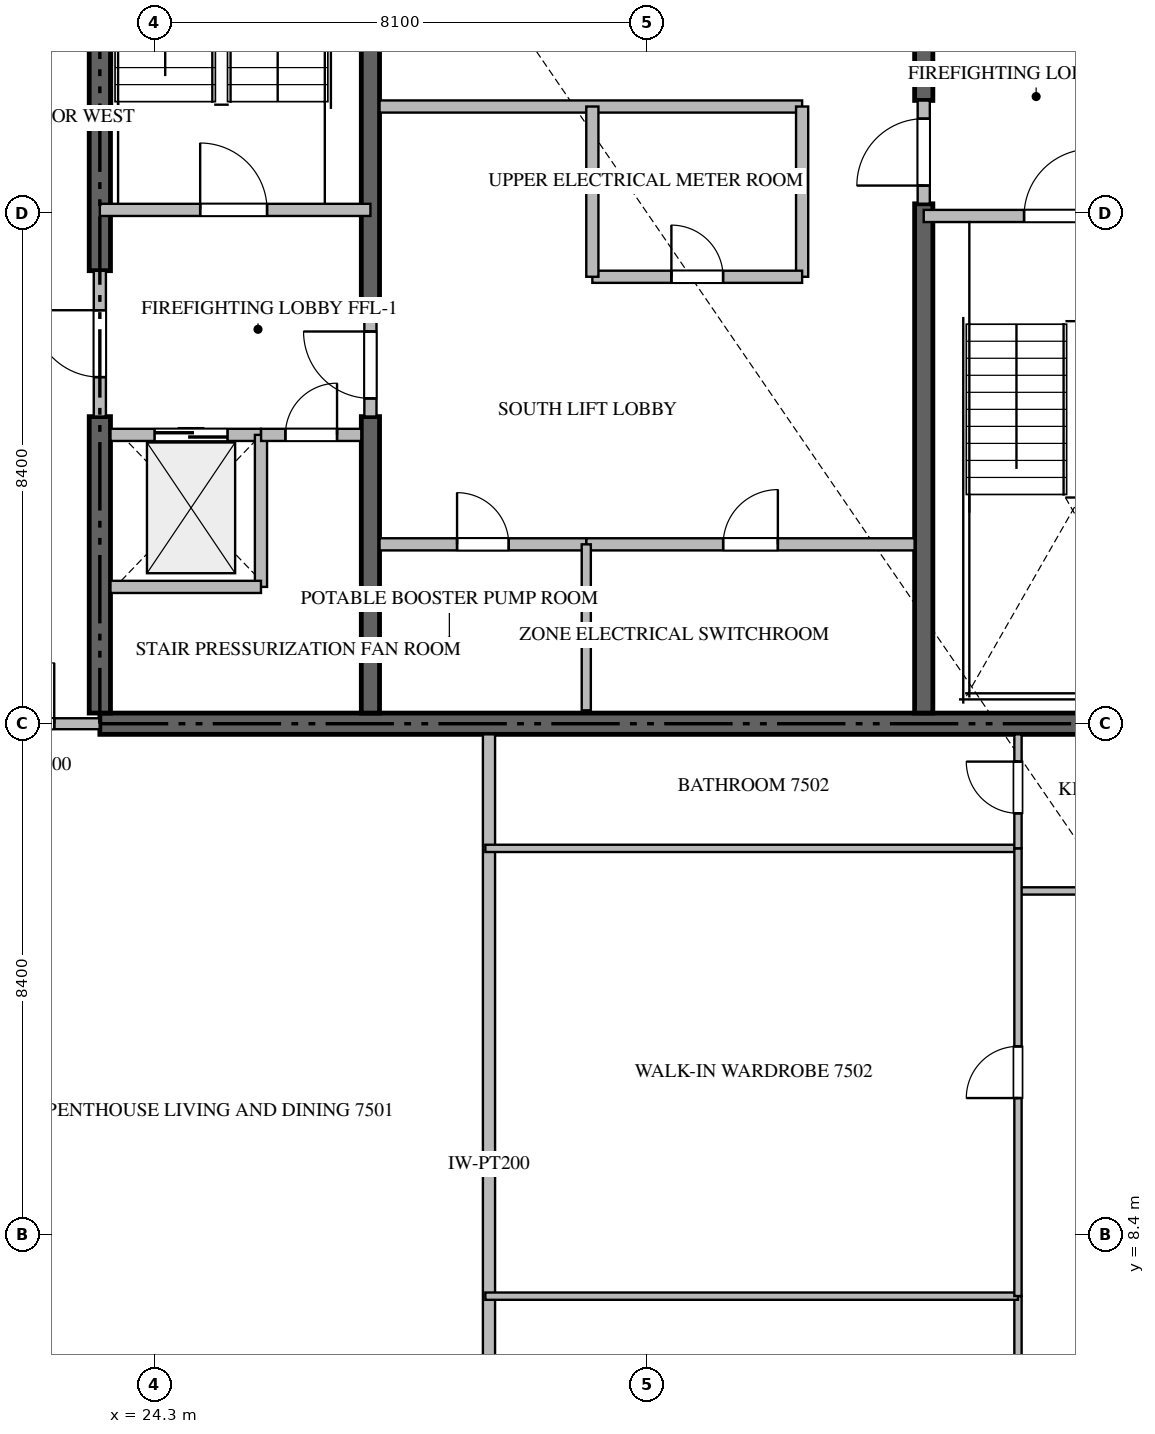
"""IFC4 building model, lengths in metres.
Left out: names, types, materials, properties, quantities, classifications, styles, units other than length and angle.
Written with IfcOpenShell. Run it as: python <this file> out.ifc"""

import sys

from ifc_helpers import new_model, si_unit, direction, frame, frame_2d, origin, place, context, subcontext, project, spatial, rectangle, extrude, source, transform, mapped, element, fill, save


model = new_model("IFC4")
c1 = context("Model", 3, precision=1e-05, world=origin(), true_north=direction((0.0, 1.0)))
c2 = subcontext(c1, "Body", "Model", "MODEL_VIEW")
j1 = project(units=[si_unit("LENGTHUNIT", "METRE"), si_unit("PLANEANGLEUNIT", "RADIAN")], contexts=[c1])
p1 = place(None, origin())
s1 = spatial("IfcSite", under=j1, at=p1, CompositionType="ELEMENT")
p2 = place(p1, origin())
s2 = spatial("IfcBuilding", under=s1, at=p2, CompositionType="ELEMENT")
p3 = place(p2, frame((0.0, 0.0, 301.55)))
s3 = spatial("IfcBuildingStorey", under=s2, at=p3, CompositionType="ELEMENT", Elevation=301.55)
p4 = place(p3, frame((23.4, 16.8, -0.26), z_axis=(0.0, 0.0, 1.0), x_axis=(1.0, 0.0, 0.0)))
e1 = element("IfcWall", 1, at=p4, inside=s3, PredefinedType="SHEAR", context=c2, shape_type="SweptSolid", body=[
    extrude(rectangle(XDim=18.0, YDim=0.35, at=frame_2d((9.0, 0.0))), origin(), (0.0, 0.0, 1.0), 4.048),
])
p5 = place(p3, frame((23.4, 16.975, -0.26), z_axis=(0.0, 0.0, 1.0), x_axis=(0.0, 1.0, 0.0)))
e2 = element("IfcWall", 2, at=p5, inside=s3, PredefinedType="SHEAR", context=c2, shape_type="SweptSolid", body=[
    extrude(rectangle(XDim=4.875, YDim=0.35, at=frame_2d((2.438, 0.0))), origin(), (0.0, 0.0, 1.0), 4.048),
])
p6 = place(p3, frame((23.4, 24.25, -0.26), z_axis=(0.0, 0.0, 1.0), x_axis=(0.0, 1.0, 0.0)))
e3 = element("IfcWall", 3, at=p6, inside=s3, PredefinedType="SHEAR", context=c2, shape_type="SweptSolid", body=[
    extrude(rectangle(XDim=9.175, YDim=0.35, at=frame_2d((4.587, 0.0))), origin(), (0.0, 0.0, 1.0), 4.048),
])
p7 = place(p3, frame((27.85, 16.975, -0.26), z_axis=(0.0, 0.0, 1.0), x_axis=(0.0, 1.0, 0.0)))
e4 = element("IfcWall", 4, at=p7, inside=s3, PredefinedType="SHEAR", context=c2, shape_type="SweptSolid", body=[
    extrude(rectangle(XDim=4.875, YDim=0.3, at=frame_2d((2.438, 0.0))), origin(), (0.0, 0.0, 1.0), 4.048),
])
p8 = place(p3, frame((27.85, 23.55, -0.26), z_axis=(0.0, 0.0, 1.0), x_axis=(0.0, 1.0, 0.0)))
e5 = element("IfcWall", 5, at=p8, inside=s3, PredefinedType="SHEAR", context=c2, shape_type="SweptSolid", body=[
    extrude(rectangle(XDim=9.875, YDim=0.3, at=frame_2d((4.938, 0.0))), origin(), (0.0, 0.0, 1.0), 4.048),
])
p9 = place(p3, frame((36.95, 16.975, -0.26), z_axis=(0.0, 0.0, 1.0), x_axis=(0.0, 1.0, 0.0)))
e6 = element("IfcWall", 6, at=p9, inside=s3, PredefinedType="SHEAR", context=c2, shape_type="SweptSolid", body=[
    extrude(rectangle(XDim=8.375, YDim=0.3, at=frame_2d((4.188, 0.0))), origin(), (0.0, 0.0, 1.0), 4.048),
])
p10 = place(p3, frame((36.95, 27.05, -0.26), z_axis=(0.0, 0.0, 1.0), x_axis=(0.0, 1.0, 0.0)))
e7 = element("IfcWall", 7, at=p10, inside=s3, PredefinedType="SHEAR", context=c2, shape_type="SweptSolid", body=[
    extrude(rectangle(XDim=6.375, YDim=0.3, at=frame_2d((3.188, 0.0))), origin(), (0.0, 0.0, 1.0), 4.048),
])
p11 = place(p3, frame((23.4, 25.25, 0.0), z_axis=(0.0, 0.0, 1.0), x_axis=(1.0, 0.0, 0.0)))
e8 = element("IfcWall", 8, at=p11, inside=s3, PredefinedType="STANDARD", context=c2, shape_type="SweptSolid", body=[
    extrude(rectangle(XDim=4.45, YDim=0.2, at=frame_2d((2.225, 0.0))), origin(), (0.0, 0.0, 1.0), 3.79),
])
p12 = place(p11, frame((1.65, 0.0, 0.0)))
e9 = element("IfcOpeningElement", 9, at=p12, cuts=e8, PredefinedType="OPENING", context=c2, shape_type="SweptSolid", body=[
    extrude(rectangle(XDim=1.1, YDim=2.15, at=frame_2d((0.55, 1.075))), frame((0.0, 0.11, 0.0), z_axis=(0.0, -1.0, 0.0), x_axis=(1.0, 0.0, 0.0)), (0.0, 0.0, 1.0), 0.22),
])
p13 = place(p3, frame((36.95, 25.15, 0.0), z_axis=(0.0, 0.0, 1.0), x_axis=(1.0, 0.0, 0.0)))
e10 = element("IfcWall", 10, at=p13, inside=s3, PredefinedType="STANDARD", context=c2, shape_type="SweptSolid", body=[
    extrude(rectangle(XDim=4.45, YDim=0.2, at=frame_2d((2.225, 0.0))), origin(), (0.0, 0.0, 1.0), 3.79),
])
p14 = place(p13, frame((1.65, 0.0, 0.0)))
e11 = element("IfcOpeningElement", 11, at=p14, cuts=e10, PredefinedType="OPENING", context=c2, shape_type="SweptSolid", body=[
    extrude(rectangle(XDim=1.1, YDim=2.15, at=frame_2d((0.55, 1.075))), frame((0.0, 0.11, 0.0), z_axis=(0.0, -1.0, 0.0), x_axis=(1.0, 0.0, 0.0)), (0.0, 0.0, 1.0), 0.22),
])
p15 = place(p3, frame((23.575, 21.55, 0.0), z_axis=(0.0, 0.0, 1.0), x_axis=(1.0, 0.0, 0.0)))
e12 = element("IfcWall", 12, at=p15, inside=s3, PredefinedType="STANDARD", context=c2, shape_type="SweptSolid", body=[
    extrude(rectangle(XDim=2.475, YDim=0.2, at=frame_2d((1.238, 0.0))), origin(), (0.0, 0.0, 1.0), 3.79),
])
p16 = place(p15, frame((0.725, 0.0, 0.0)))
e13 = element("IfcOpeningElement", 13, at=p16, cuts=e12, PredefinedType="OPENING", context=c2, shape_type="SweptSolid", body=[
    extrude(rectangle(XDim=1.2, YDim=2.2, at=frame_2d((0.6, 1.1))), frame((0.0, 0.11, 0.0), z_axis=(0.0, -1.0, 0.0), x_axis=(1.0, 0.0, 0.0)), (0.0, 0.0, 1.0), 0.22),
])
p17 = place(p3, frame((26.05, 19.05, 0.0), z_axis=(0.0, 0.0, 1.0), x_axis=(0.0, 1.0, 0.0)))
e14 = element("IfcWall", 14, at=p17, inside=s3, PredefinedType="STANDARD", context=c2, shape_type="SweptSolid", body=[
    extrude(rectangle(XDim=2.5, YDim=0.2, at=frame_2d((1.25, 0.0))), origin(), (0.0, 0.0, 1.0), 3.79),
])
p18 = place(p3, frame((23.575, 19.05, 0.0), z_axis=(0.0, 0.0, 1.0), x_axis=(1.0, 0.0, 0.0)))
e15 = element("IfcWall", 15, at=p18, inside=s3, PredefinedType="STANDARD", context=c2, shape_type="SweptSolid", body=[
    extrude(rectangle(XDim=2.475, YDim=0.2, at=frame_2d((1.238, 0.0))), origin(), (0.0, 0.0, 1.0), 3.79),
])
p19 = place(p3, frame((26.052, 21.55, 0.0), z_axis=(0.0, 0.0, 1.0), x_axis=(1.0, 0.0, 0.0)))
e16 = element("IfcWall", 16, at=p19, inside=s3, PredefinedType="STANDARD", context=c2, shape_type="SweptSolid", body=[
    extrude(rectangle(XDim=1.648, YDim=0.2, at=frame_2d((0.824, 0.0))), origin(), (0.0, 0.0, 1.0), 3.79),
])
p20 = place(p19, frame((0.399, 0.0, 0.0)))
e17 = element("IfcOpeningElement", 17, at=p20, cuts=e16, PredefinedType="OPENING", context=c2, shape_type="SweptSolid", body=[
    extrude(rectangle(XDim=0.85, YDim=2.1, at=frame_2d((0.425, 1.05))), frame((0.0, 0.11, 0.0), z_axis=(0.0, -1.0, 0.0), x_axis=(1.0, 0.0, 0.0)), (0.0, 0.0, 1.0), 0.22),
])
p21 = place(p3, frame((23.4, 21.852, 0.0), z_axis=(0.0, 0.0, 1.0), x_axis=(0.0, 1.0, 0.0)))
e18 = element("IfcWall", 18, at=p21, inside=s3, PredefinedType="STANDARD", context=c2, shape_type="SweptSolid", body=[
    extrude(rectangle(XDim=2.396, YDim=0.2, at=frame_2d((1.198, 0.0))), origin(), (0.0, 0.0, 1.0), 3.79),
])
p22 = place(p21, frame((0.648, 0.0, 0.0)))
e19 = element("IfcOpeningElement", 19, at=p22, cuts=e18, PredefinedType="OPENING", context=c2, shape_type="SweptSolid", body=[
    extrude(rectangle(XDim=1.1, YDim=2.15, at=frame_2d((0.55, 1.075))), frame((0.0, 0.11, 0.0), z_axis=(0.0, -1.0, 0.0), x_axis=(1.0, 0.0, 0.0)), (0.0, 0.0, 1.0), 0.22),
])
p23 = place(p3, frame((27.85, 21.852, 0.0), z_axis=(0.0, 0.0, 1.0), x_axis=(0.0, 1.0, 0.0)))
e20 = element("IfcWall", 20, at=p23, inside=s3, PredefinedType="STANDARD", context=c2, shape_type="SweptSolid", body=[
    extrude(rectangle(XDim=1.696, YDim=0.2, at=frame_2d((0.848, 0.0))), origin(), (0.0, 0.0, 1.0), 3.79),
])
p24 = place(p23, frame((0.298, 0.0, 0.0)))
e21 = element("IfcOpeningElement", 21, at=p24, cuts=e20, PredefinedType="OPENING", context=c2, shape_type="SweptSolid", body=[
    extrude(rectangle(XDim=1.1, YDim=2.15, at=frame_2d((0.55, 1.075))), frame((0.0, 0.11, 0.0), z_axis=(0.0, -1.0, 0.0), x_axis=(1.0, 0.0, 0.0)), (0.0, 0.0, 1.0), 0.22),
])
p25 = place(p3, frame((36.95, 25.352, 0.0), z_axis=(0.0, 0.0, 1.0), x_axis=(0.0, 1.0, 0.0)))
e22 = element("IfcWall", 22, at=p25, inside=s3, PredefinedType="STANDARD", context=c2, shape_type="SweptSolid", body=[
    extrude(rectangle(XDim=1.696, YDim=0.2, at=frame_2d((0.848, 0.0))), origin(), (0.0, 0.0, 1.0), 3.79),
])
p26 = place(p25, frame((0.298, 0.0, 0.0)))
e23 = element("IfcOpeningElement", 23, at=p26, cuts=e22, PredefinedType="OPENING", context=c2, shape_type="SweptSolid", body=[
    extrude(rectangle(XDim=1.1, YDim=2.15, at=frame_2d((0.55, 1.075))), frame((0.0, 0.11, 0.0), z_axis=(0.0, -1.0, 0.0), x_axis=(1.0, 0.0, 0.0)), (0.0, 0.0, 1.0), 0.22),
])
p27 = place(p3, frame((28.0, 19.75, 0.0), z_axis=(0.0, 0.0, 1.0), x_axis=(1.0, 0.0, 0.0)))
e24 = element("IfcWall", 24, at=p27, inside=s3, PredefinedType="STANDARD", context=c2, shape_type="SweptSolid", body=[
    extrude(rectangle(XDim=3.4, YDim=0.2, at=frame_2d((1.7, 0.0))), origin(), (0.0, 0.0, 1.0), 3.79),
])
p28 = place(p27, frame((1.275, 0.0, 0.0)))
e25 = element("IfcOpeningElement", 25, at=p28, cuts=e24, PredefinedType="OPENING", context=c2, shape_type="SweptSolid", body=[
    extrude(rectangle(XDim=0.85, YDim=2.1, at=frame_2d((0.425, 1.05))), frame((0.0, 0.11, 0.0), z_axis=(0.0, -1.0, 0.0), x_axis=(1.0, 0.0, 0.0)), (0.0, 0.0, 1.0), 0.22),
])
p29 = place(p3, frame((31.402, 19.75, 0.0), z_axis=(0.0, 0.0, 1.0), x_axis=(1.0, 0.0, 0.0)))
e26 = element("IfcWall", 26, at=p29, inside=s3, PredefinedType="STANDARD", context=c2, shape_type="SweptSolid", body=[
    extrude(rectangle(XDim=5.398, YDim=0.2, at=frame_2d((2.699, 0.0))), origin(), (0.0, 0.0, 1.0), 3.79),
])
p30 = place(p29, frame((2.249, 0.0, 0.0)))
e27 = element("IfcOpeningElement", 27, at=p30, cuts=e26, PredefinedType="OPENING", context=c2, shape_type="SweptSolid", body=[
    extrude(rectangle(XDim=0.9, YDim=2.1, at=frame_2d((0.45, 1.05))), frame((0.0, 0.11, 0.0), z_axis=(0.0, -1.0, 0.0), x_axis=(1.0, 0.0, 0.0)), (0.0, 0.0, 1.0), 0.22),
])
p31 = place(p3, frame((31.4, 17.02, 0.0), z_axis=(0.0, 0.0, 1.0), x_axis=(0.0, 1.0, 0.0)))
e28 = element("IfcWall", 28, at=p31, inside=s3, PredefinedType="PARTITIONING", context=c2, shape_type="SweptSolid", body=[
    extrude(rectangle(XDim=2.73, YDim=0.15, at=frame_2d((1.365, 0.0))), origin(), (0.0, 0.0, 1.0), 3.79),
])
p32 = place(p3, frame((28.0, 26.95, 0.0), z_axis=(0.0, 0.0, 1.0), x_axis=(1.0, 0.0, 0.0)))
e29 = element("IfcWall", 29, at=p32, inside=s3, PredefinedType="STANDARD", context=c2, shape_type="SweptSolid", body=[
    extrude(rectangle(XDim=6.95, YDim=0.2, at=frame_2d((3.475, 0.0))), origin(), (0.0, 0.0, 1.0), 3.79),
])
p33 = place(p3, frame((34.95, 24.15, 0.0), z_axis=(0.0, 0.0, 1.0), x_axis=(0.0, 1.0, 0.0)))
e30 = element("IfcWall", 30, at=p33, inside=s3, PredefinedType="STANDARD", context=c2, shape_type="SweptSolid", body=[
    extrude(rectangle(XDim=2.8, YDim=0.2, at=frame_2d((1.4, 0.0))), origin(), (0.0, 0.0, 1.0), 3.79),
])
p34 = place(p3, frame((31.5, 24.15, 0.0), z_axis=(0.0, 0.0, 1.0), x_axis=(1.0, 0.0, 0.0)))
e31 = element("IfcWall", 31, at=p34, inside=s3, PredefinedType="STANDARD", context=c2, shape_type="SweptSolid", body=[
    extrude(rectangle(XDim=3.45, YDim=0.2, at=frame_2d((1.725, 0.0))), origin(), (0.0, 0.0, 1.0), 3.79),
])
p35 = place(p34, frame((1.3, 0.0, 0.0)))
e32 = element("IfcOpeningElement", 32, at=p35, cuts=e31, PredefinedType="OPENING", context=c2, shape_type="SweptSolid", body=[
    extrude(rectangle(XDim=0.85, YDim=2.1, at=frame_2d((0.425, 1.05))), frame((0.0, 0.11, 0.0), z_axis=(0.0, -1.0, 0.0), x_axis=(1.0, 0.0, 0.0)), (0.0, 0.0, 1.0), 0.22),
])
p36 = place(p3, frame((31.5, 24.15, 0.0), z_axis=(0.0, 0.0, 1.0), x_axis=(0.0, 1.0, 0.0)))
e33 = element("IfcWall", 33, at=p36, inside=s3, PredefinedType="STANDARD", context=c2, shape_type="SweptSolid", body=[
    extrude(rectangle(XDim=2.8, YDim=0.2, at=frame_2d((1.4, 0.0))), origin(), (0.0, 0.0, 1.0), 3.79),
])
p37 = place(p3, frame((29.8, 2.482, 0.0), z_axis=(0.0, 0.0, 1.0), x_axis=(0.0, 1.0, 0.0)))
e34 = element("IfcWall", 34, at=p37, inside=s3, PredefinedType="PARTITIONING", context=c2, shape_type="SweptSolid", body=[
    extrude(rectangle(XDim=14.143, YDim=0.2, at=frame_2d((7.072, 0.0))), origin(), (0.0, 0.0, 1.0), 3.79),
])
p38 = place(p3, frame((20.902, 16.8, 0.0), z_axis=(0.0, 0.0, 1.0), x_axis=(1.0, 0.0, 0.0)))
e35 = element("IfcWall", 35, at=p38, inside=s3, PredefinedType="PARTITIONING", context=c2, shape_type="SweptSolid", body=[
    extrude(rectangle(XDim=2.496, YDim=0.18, at=frame_2d((1.248, 0.0))), origin(), (0.0, 0.0, 1.0), 3.79),
])
p39 = place(p38, frame((0.748, 0.0, 0.0)))
e36 = element("IfcOpeningElement", 36, at=p39, cuts=e35, PredefinedType="OPENING", context=c2, shape_type="SweptSolid", body=[
    extrude(rectangle(XDim=1.0, YDim=2.15, at=frame_2d((0.5, 1.075))), frame((0.0, 0.1, 0.0), z_axis=(0.0, -1.0, 0.0), x_axis=(1.0, 0.0, 0.0)), (0.0, 0.0, 1.0), 0.2),
])
p40 = place(p3, frame((38.5, 14.05, 0.0), z_axis=(0.0, 0.0, 1.0), x_axis=(1.0, 0.0, 0.0)))
e37 = element("IfcWall", 37, at=p40, inside=s3, PredefinedType="PARTITIONING", context=c2, shape_type="SweptSolid", body=[
    extrude(rectangle(XDim=2.85, YDim=0.12, at=frame_2d((1.425, 0.0))), origin(), (0.0, 0.0, 1.0), 3.79),
])
p41 = place(p40, frame((1.0, 0.0, 0.0)))
e38 = element("IfcOpeningElement", 38, at=p41, cuts=e37, PredefinedType="OPENING", context=c2, shape_type="SweptSolid", body=[
    extrude(rectangle(XDim=0.85, YDim=2.1, at=frame_2d((0.425, 1.05))), frame((0.0, 0.07, 0.0), z_axis=(0.0, -1.0, 0.0), x_axis=(1.0, 0.0, 0.0)), (0.0, 0.0, 1.0), 0.14),
])
p42 = place(p3, frame((38.5, 2.495, 0.0), z_axis=(0.0, 0.0, 1.0), x_axis=(0.0, 1.0, 0.0)))
e39 = element("IfcWall", 39, at=p42, inside=s3, PredefinedType="PARTITIONING", context=c2, shape_type="SweptSolid", body=[
    extrude(rectangle(XDim=4.891, YDim=0.12, at=frame_2d((2.445, 0.0))), origin(), (0.0, 0.0, 1.0), 3.79),
])
p43 = place(p42, frame((2.195, 0.0, 0.0)))
e40 = element("IfcOpeningElement", 40, at=p43, cuts=e39, PredefinedType="OPENING", context=c2, shape_type="SweptSolid", body=[
    extrude(rectangle(XDim=0.9, YDim=2.1, at=frame_2d((0.45, 1.05))), frame((0.0, 0.07, 0.0), z_axis=(0.0, -1.0, 0.0), x_axis=(1.0, 0.0, 0.0)), (0.0, 0.0, 1.0), 0.14),
])
for number, where, z_axis, x_axis in (
    (41, (29.74, 7.386, 0.0), (0.0, 0.0, 1.0), (1.0, 0.0, 0.0)),
    (42, (29.74, 14.75, 0.0), (0.0, 0.0, 1.0), (1.0, 0.0, 0.0)),
):
    element("IfcWall", number, at=place(p3, frame(where, z_axis=z_axis, x_axis=x_axis)), inside=s3, PredefinedType="PARTITIONING", context=c2, shape_type="SweptSolid", body=[
        extrude(rectangle(XDim=8.76, YDim=0.12, at=frame_2d((4.38, 0.0))), origin(), (0.0, 0.0, 1.0), 3.79),
    ])
p44 = place(p3, frame((38.5, 7.388, 0.0), z_axis=(0.0, 0.0, 1.0), x_axis=(0.0, 1.0, 0.0)))
e43 = element("IfcWall", 43, at=p44, inside=s3, PredefinedType="PARTITIONING", context=c2, shape_type="SweptSolid", body=[
    extrude(rectangle(XDim=7.362, YDim=0.12, at=frame_2d((3.681, 0.0))), origin(), (0.0, 0.0, 1.0), 3.79),
])
p45 = place(p44, frame((3.256, 0.0, 0.0)))
e44 = element("IfcOpeningElement", 44, at=p45, cuts=e43, PredefinedType="OPENING", context=c2, shape_type="SweptSolid", body=[
    extrude(rectangle(XDim=0.85, YDim=2.1, at=frame_2d((0.425, 1.05))), frame((0.0, 0.07, 0.0), z_axis=(0.0, -1.0, 0.0), x_axis=(1.0, 0.0, 0.0)), (0.0, 0.0, 1.0), 0.14),
])
p46 = place(p3, frame((38.5, 14.752, 0.0), z_axis=(0.0, 0.0, 1.0), x_axis=(0.0, 1.0, 0.0)))
e45 = element("IfcWall", 45, at=p46, inside=s3, PredefinedType="PARTITIONING", context=c2, shape_type="SweptSolid", body=[
    extrude(rectangle(XDim=1.873, YDim=0.12, at=frame_2d((0.937, 0.0))), origin(), (0.0, 0.0, 1.0), 3.79),
])
p47 = place(p46, frame((0.575, 0.0, 0.0)))
e46 = element("IfcOpeningElement", 46, at=p47, cuts=e45, PredefinedType="OPENING", context=c2, shape_type="SweptSolid", body=[
    extrude(rectangle(XDim=0.85, YDim=2.1, at=frame_2d((0.425, 1.05))), frame((0.0, 0.07, 0.0), z_axis=(0.0, -1.0, 0.0), x_axis=(1.0, 0.0, 0.0)), (0.0, 0.0, 1.0), 0.14),
])
m1 = source(origin(), c2, "Body", "SweptSolid", [
    extrude(rectangle(XDim=1.1, YDim=2.15, at=frame_2d((0.55, 1.075))), frame((0.0, 0.025, 0.0), z_axis=(0.0, -1.0, 0.0), x_axis=(1.0, 0.0, 0.0)), (0.0, 0.0, 1.0), 0.05),
])
p48 = place(p12, origin())
e47 = element("IfcDoor", 47, at=p48, inside=s3, OperationType="SINGLE_SWING_LEFT", PredefinedType="DOOR", context=c2, shape_type="MappedRepresentation", body=[
    mapped(m1, transform((0.0, 0.0, 0.0), scale=1.0)),
])
fill(e9, e47)
p49 = place(p14, origin())
e48 = element("IfcDoor", 48, at=p49, inside=s3, OperationType="SINGLE_SWING_RIGHT", PredefinedType="DOOR", context=c2, shape_type="MappedRepresentation", body=[
    mapped(m1, transform((0.0, 0.0, 0.0), scale=1.0)),
])
fill(e11, e48)
m2 = source(origin(), c2, "Body", "SweptSolid", [
    extrude(rectangle(XDim=1.2, YDim=2.2, at=frame_2d((0.6, 1.1))), frame((0.0, 0.025, 0.0), z_axis=(0.0, -1.0, 0.0), x_axis=(1.0, 0.0, 0.0)), (0.0, 0.0, 1.0), 0.05),
])
p50 = place(p16, origin())
e49 = element("IfcDoor", 49, at=p50, inside=s3, OperationType="DOUBLE_DOOR_SLIDING", PredefinedType="DOOR", context=c2, shape_type="MappedRepresentation", body=[
    mapped(m2, transform((0.0, 0.0, 0.0), scale=1.0)),
])
fill(e13, e49)
m3 = source(origin(), c2, "Body", "SweptSolid", [
    extrude(rectangle(XDim=0.85, YDim=2.1, at=frame_2d((0.425, 1.05))), frame((0.0, 0.025, 0.0), z_axis=(0.0, -1.0, 0.0), x_axis=(1.0, 0.0, 0.0)), (0.0, 0.0, 1.0), 0.05),
])
p51 = place(p20, origin())
e50 = element("IfcDoor", 50, at=p51, inside=s3, OperationType="SINGLE_SWING_RIGHT", PredefinedType="DOOR", context=c2, shape_type="MappedRepresentation", body=[
    mapped(m3, transform((0.0, 0.0, 0.0), scale=1.0)),
])
fill(e17, e50)
p52 = place(p22, origin())
e51 = element("IfcDoor", 51, at=p52, inside=s3, OperationType="SINGLE_SWING_RIGHT", PredefinedType="DOOR", context=c2, shape_type="MappedRepresentation", body=[
    mapped(m1, transform((0.0, 0.0, 0.0), scale=1.0)),
])
fill(e19, e51)
p53 = place(p24, origin())
e52 = element("IfcDoor", 52, at=p53, inside=s3, OperationType="SINGLE_SWING_RIGHT", PredefinedType="DOOR", context=c2, shape_type="MappedRepresentation", body=[
    mapped(m1, transform((0.0, 0.0, 0.0), scale=1.0)),
])
fill(e21, e52)
p54 = place(p26, origin())
e53 = element("IfcDoor", 53, at=p54, inside=s3, OperationType="SINGLE_SWING_LEFT", PredefinedType="DOOR", context=c2, shape_type="MappedRepresentation", body=[
    mapped(m1, transform((0.0, 0.0, 0.0), scale=1.0)),
])
fill(e23, e53)
p55 = place(p28, origin())
e54 = element("IfcDoor", 54, at=p55, inside=s3, OperationType="SINGLE_SWING_LEFT", PredefinedType="DOOR", context=c2, shape_type="MappedRepresentation", body=[
    mapped(m3, transform((0.0, 0.0, 0.0), scale=1.0)),
])
fill(e25, e54)
m4 = source(origin(), c2, "Body", "SweptSolid", [
    extrude(rectangle(XDim=0.9, YDim=2.1, at=frame_2d((0.45, 1.05))), frame((0.0, 0.025, 0.0), z_axis=(0.0, -1.0, 0.0), x_axis=(1.0, 0.0, 0.0)), (0.0, 0.0, 1.0), 0.05),
])
p56 = place(p30, origin())
e55 = element("IfcDoor", 55, at=p56, inside=s3, OperationType="SINGLE_SWING_RIGHT", PredefinedType="DOOR", context=c2, shape_type="MappedRepresentation", body=[
    mapped(m4, transform((0.0, 0.0, 0.0), scale=1.0)),
])
fill(e27, e55)
p57 = place(p35, origin())
e56 = element("IfcDoor", 56, at=p57, inside=s3, OperationType="SINGLE_SWING_LEFT", PredefinedType="DOOR", context=c2, shape_type="MappedRepresentation", body=[
    mapped(m3, transform((0.0, 0.0, 0.0), scale=1.0)),
])
fill(e32, e56)
m5 = source(origin(), c2, "Body", "SweptSolid", [
    extrude(rectangle(XDim=1.0, YDim=2.15, at=frame_2d((0.5, 1.075))), frame((0.0, 0.025, 0.0), z_axis=(0.0, -1.0, 0.0), x_axis=(1.0, 0.0, 0.0)), (0.0, 0.0, 1.0), 0.05),
])
p58 = place(p39, origin())
e57 = element("IfcDoor", 57, at=p58, inside=s3, OperationType="SINGLE_SWING_RIGHT", PredefinedType="DOOR", context=c2, shape_type="MappedRepresentation", body=[
    mapped(m5, transform((0.0, 0.0, 0.0), scale=1.0)),
])
fill(e36, e57)
p59 = place(p45, origin())
e58 = element("IfcDoor", 58, at=p59, inside=s3, OperationType="SINGLE_SWING_LEFT", PredefinedType="DOOR", context=c2, shape_type="MappedRepresentation", body=[
    mapped(m3, transform((0.0, 0.0, 0.0), scale=1.0)),
])
fill(e44, e58)
p60 = place(p47, origin())
e59 = element("IfcDoor", 59, at=p60, inside=s3, OperationType="SINGLE_SWING_RIGHT", PredefinedType="DOOR", context=c2, shape_type="MappedRepresentation", body=[
    mapped(m3, transform((0.0, 0.0, 0.0), scale=1.0)),
])
fill(e46, e59)
save(model, sys.argv[1])
